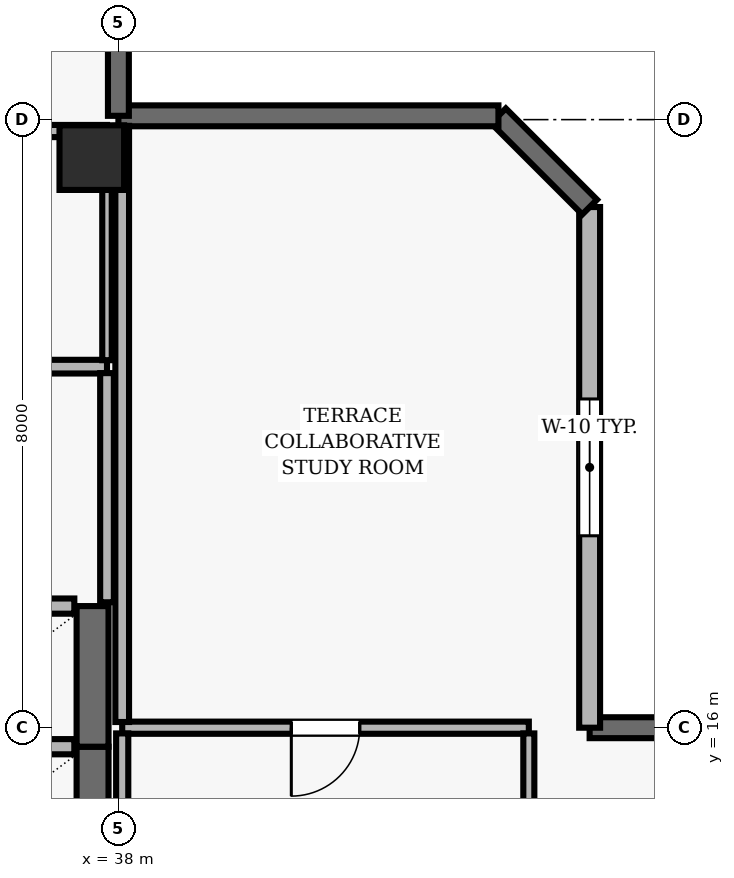
"""IFC4 building model, lengths in metres.
Left out: names, types, materials, properties, quantities, classifications, styles, units other than length and angle.
Written with IfcOpenShell. Run it as: python <this file> out.ifc"""

import sys

from ifc_helpers import new_model, si_unit, direction, frame, frame_2d, origin, origin_2d, place, context, subcontext, project, spatial, rectangle, extrude, element, fill, save


model = new_model("IFC4")
c1 = context("Model", 3, precision=1e-05, world=origin(), true_north=direction((0.0, 1.0)))
c2 = subcontext(c1, "Body", "Model", "MODEL_VIEW")
j1 = project(units=[si_unit("LENGTHUNIT", "METRE"), si_unit("PLANEANGLEUNIT", "RADIAN")], contexts=[c1])
p1 = place(None, origin())
s1 = spatial("IfcSite", under=j1, at=p1, CompositionType="ELEMENT")
p2 = place(p1, origin())
s2 = spatial("IfcBuilding", under=s1, at=p2, CompositionType="ELEMENT")
p3 = place(p2, frame((0.0, 0.0, 263.8)))
s3 = spatial("IfcBuildingStorey", under=s2, at=p3, CompositionType="ELEMENT", Elevation=263.8)
p4 = place(p3, frame((37.65, 23.5, 0.0), z_axis=(0.0, 0.0, 1.0), x_axis=(1.0, 0.0, 0.0)))
e1 = element("IfcColumn", 1, at=p4, inside=s3, PredefinedType="COLUMN", context=c2, shape_type="SweptSolid", body=[
    extrude(rectangle(XDim=0.85, YDim=0.85, at=origin_2d()), origin(), (0.0, 0.0, 1.0), 3.9),
])
p5 = place(p3, frame((57.3, 16.0, 0.0), z_axis=(0.0, 0.0, 1.0), x_axis=(-1.0, 0.0, 0.0)))
e2 = element("IfcWall", 2, at=p5, inside=s3, PredefinedType="SOLIDWALL", context=c2, shape_type="SweptSolid", body=[
    extrude(rectangle(XDim=13.1, YDim=0.275, at=frame_2d((6.55, 0.0))), origin(), (0.0, 0.0, 1.0), 3.69),
])
p6 = place(p5, frame((7.05, 0.0, 0.0)))
e3 = element("IfcOpeningElement", 3, at=p6, cuts=e2, PredefinedType="OPENING", context=c2, shape_type="SweptSolid", body=[
    extrude(rectangle(XDim=1.0, YDim=2.2, at=frame_2d((0.5, 1.1))), frame((0.0, 0.147, 0.0), z_axis=(0.0, -1.0, 0.0), x_axis=(1.0, 0.0, 0.0)), (0.0, 0.0, 1.0), 0.295),
])
p7 = place(p5, frame((1.875, 0.0, 0.9)))
e4 = element("IfcOpeningElement", 4, at=p7, cuts=e2, PredefinedType="OPENING", context=c2, shape_type="SweptSolid", body=[
    extrude(rectangle(XDim=2.8, YDim=1.8, at=frame_2d((1.4, 0.9))), frame((0.0, 0.147, 0.0), z_axis=(0.0, -1.0, 0.0), x_axis=(1.0, 0.0, 0.0)), (0.0, 0.0, 1.0), 0.295),
])
p8 = place(p5, frame((8.425, 0.0, 0.9)))
e5 = element("IfcOpeningElement", 5, at=p8, cuts=e2, PredefinedType="OPENING", context=c2, shape_type="SweptSolid", body=[
    extrude(rectangle(XDim=2.8, YDim=1.8, at=frame_2d((1.4, 0.9))), frame((0.0, 0.147, 0.0), z_axis=(0.0, -1.0, 0.0), x_axis=(1.0, 0.0, 0.0)), (0.0, 0.0, 1.0), 0.295),
])
p9 = place(p3, frame((44.2, 16.0, 0.0), z_axis=(0.0, 0.0, 1.0), x_axis=(0.0, 1.0, 0.0)))
e6 = element("IfcWall", 6, at=p9, inside=s3, PredefinedType="SOLIDWALL", context=c2, shape_type="SweptSolid", body=[
    extrude(rectangle(XDim=6.85, YDim=0.275, at=frame_2d((3.425, 0.0))), origin(), (0.0, 0.0, 1.0), 3.69),
])
p10 = place(p9, frame((2.525, 0.0, 0.9)))
e7 = element("IfcOpeningElement", 7, at=p10, cuts=e6, PredefinedType="OPENING", context=c2, shape_type="SweptSolid", body=[
    extrude(rectangle(XDim=1.8, YDim=2.2, at=frame_2d((0.9, 1.1))), frame((0.0, 0.147, 0.0), z_axis=(0.0, -1.0, 0.0), x_axis=(1.0, 0.0, 0.0)), (0.0, 0.0, 1.0), 0.295),
])
p11 = place(p3, frame((44.2, 22.85, 0.0), z_axis=(0.0, 0.0, 1.0), x_axis=(-0.707106781187, 0.707106781187, 0.0)))
e8 = element("IfcWall", 8, at=p11, inside=s3, PredefinedType="SOLIDWALL", context=c2, shape_type="SweptSolid", body=[
    extrude(rectangle(XDim=1.697, YDim=0.275, at=frame_2d((0.849, 0.0))), origin(), (0.0, 0.0, 1.0), 3.69),
])
p12 = place(p3, frame((43.0, 24.05, 0.0), z_axis=(0.0, 0.0, 1.0), x_axis=(-1.0, 0.0, 0.0)))
e9 = element("IfcWall", 9, at=p12, inside=s3, PredefinedType="SOLIDWALL", context=c2, shape_type="SweptSolid", body=[
    extrude(rectangle(XDim=5.0, YDim=0.275, at=frame_2d((2.5, 0.0))), origin(), (0.0, 0.0, 1.0), 3.69),
])
p13 = place(p3, frame((38.0, 24.05, 0.0), z_axis=(0.0, 0.0, 1.0), x_axis=(0.0, 1.0, 0.0)))
e10 = element("IfcWall", 10, at=p13, inside=s3, PredefinedType="SOLIDWALL", context=c2, shape_type="SweptSolid", body=[
    extrude(rectangle(XDim=11.25, YDim=0.275, at=frame_2d((5.625, 0.0))), origin(), (0.0, 0.0, 1.0), 3.69),
])
p14 = place(p13, frame((7.425, 0.0, 0.0)))
e11 = element("IfcOpeningElement", 11, at=p14, cuts=e10, PredefinedType="OPENING", context=c2, shape_type="SweptSolid", body=[
    extrude(rectangle(XDim=1.0, YDim=2.2, at=frame_2d((0.5, 1.1))), frame((0.0, 0.147, 0.0), z_axis=(0.0, -1.0, 0.0), x_axis=(1.0, 0.0, 0.0)), (0.0, 0.0, 1.0), 0.295),
])
p15 = place(p13, frame((2.662, 0.0, 0.9)))
e12 = element("IfcOpeningElement", 12, at=p15, cuts=e10, PredefinedType="OPENING", context=c2, shape_type="SweptSolid", body=[
    extrude(rectangle(XDim=1.2, YDim=1.6, at=frame_2d((0.6, 0.8))), frame((0.0, 0.147, 0.0), z_axis=(0.0, -1.0, 0.0), x_axis=(1.0, 0.0, 0.0)), (0.0, 0.0, 1.0), 0.295),
])
p16 = place(p3, frame((37.66, 13.9, 0.0), z_axis=(0.0, 0.0, 1.0), x_axis=(0.0, 1.0, 0.0)))
e13 = element("IfcWall", 13, at=p16, inside=s3, PredefinedType="SHEAR", context=c2, shape_type="SweptSolid", body=[
    extrude(rectangle(XDim=1.85, YDim=0.42, at=frame_2d((0.925, 0.0))), origin(), (0.0, 0.0, 1.0), 3.69),
])
p17 = place(p3, frame((37.42, 15.75, 0.0), z_axis=(0.0, 0.0, 1.0), x_axis=(-1.0, 0.0, 0.0)))
e14 = element("IfcWall", 14, at=p17, inside=s3, PredefinedType="SOLIDWALL", context=c2, shape_type="SweptSolid", body=[
    extrude(rectangle(XDim=2.14, YDim=0.2, at=frame_2d((1.07, 0.0))), origin(), (0.0, 0.0, 1.0), 3.69),
])
p18 = place(p3, frame((37.66, 15.75, 0.0), z_axis=(0.0, 0.0, 1.0), x_axis=(0.0, 1.0, 0.0)))
e15 = element("IfcWall", 15, at=p18, inside=s3, PredefinedType="SHEAR", context=c2, shape_type="SweptSolid", body=[
    extrude(rectangle(XDim=1.85, YDim=0.42, at=frame_2d((0.925, 0.0))), origin(), (0.0, 0.0, 1.0), 3.69),
])
p19 = place(p3, frame((37.42, 17.6, 0.0), z_axis=(0.0, 0.0, 1.0), x_axis=(-1.0, 0.0, 0.0)))
e16 = element("IfcWall", 16, at=p19, inside=s3, PredefinedType="SOLIDWALL", context=c2, shape_type="SweptSolid", body=[
    extrude(rectangle(XDim=2.14, YDim=0.2, at=frame_2d((1.07, 0.0))), origin(), (0.0, 0.0, 1.0), 3.69),
])
p20 = place(p3, frame((37.85, 20.75, 0.0), z_axis=(0.0, 0.0, 1.0), x_axis=(-1.0, 0.0, 0.0)))
e17 = element("IfcWall", 17, at=p20, inside=s3, PredefinedType="PARTITIONING", context=c2, shape_type="SweptSolid", body=[
    extrude(rectangle(XDim=4.0, YDim=0.18, at=frame_2d((2.0, 0.0))), origin(), (0.0, 0.0, 1.0), 3.69),
])
p21 = place(p3, frame((37.85, 23.85, 0.0), z_axis=(0.0, 0.0, 1.0), x_axis=(-1.0, 0.0, 0.0)))
e18 = element("IfcWall", 18, at=p21, inside=s3, PredefinedType="PARTITIONING", context=c2, shape_type="SweptSolid", body=[
    extrude(rectangle(XDim=4.0, YDim=0.16, at=frame_2d((2.0, 0.0))), origin(), (0.0, 0.0, 1.0), 3.221),
])
p22 = place(p21, frame((1.9, 0.0, 0.0)))
e19 = element("IfcOpeningElement", 19, at=p22, cuts=e18, PredefinedType="OPENING", context=c2, shape_type="SweptSolid", body=[
    extrude(rectangle(XDim=0.9, YDim=2.1, at=frame_2d((0.45, 1.05))), frame((0.0, 0.09, 0.0), z_axis=(0.0, -1.0, 0.0), x_axis=(1.0, 0.0, 0.0)), (0.0, 0.0, 1.0), 0.18),
])
p23 = place(p3, frame((43.4, 16.0, 0.0), z_axis=(0.0, 0.0, 1.0), x_axis=(-1.0, 0.0, 0.0)))
e20 = element("IfcWall", 20, at=p23, inside=s3, PredefinedType="PARTITIONING", context=c2, shape_type="SweptSolid", body=[
    extrude(rectangle(XDim=5.35, YDim=0.16, at=frame_2d((2.675, 0.0))), origin(), (0.0, 0.0, 1.0), 3.39),
])
p24 = place(p23, frame((2.225, 0.0, 0.0)))
e21 = element("IfcOpeningElement", 21, at=p24, cuts=e20, PredefinedType="OPENING", context=c2, shape_type="SweptSolid", body=[
    extrude(rectangle(XDim=0.9, YDim=2.1, at=frame_2d((0.45, 1.05))), frame((0.0, 0.09, 0.0), z_axis=(0.0, -1.0, 0.0), x_axis=(1.0, 0.0, 0.0)), (0.0, 0.0, 1.0), 0.18),
])
p25 = place(p3, frame((37.85, 17.65, 0.0), z_axis=(0.0, 0.0, 1.0), x_axis=(0.0, 1.0, 0.0)))
e22 = element("IfcWall", 22, at=p25, inside=s3, PredefinedType="PARTITIONING", context=c2, shape_type="SweptSolid", body=[
    extrude(rectangle(XDim=3.015, YDim=0.18, at=frame_2d((1.508, 0.0))), origin(), (0.0, 0.0, 1.0), 3.221),
])
p26 = place(p3, frame((37.85, 20.835, 0.0), z_axis=(0.0, 0.0, 1.0), x_axis=(0.0, 1.0, 0.0)))
e23 = element("IfcWall", 23, at=p26, inside=s3, PredefinedType="PARTITIONING", context=c2, shape_type="SweptSolid", body=[
    extrude(rectangle(XDim=2.94, YDim=0.125, at=frame_2d((1.47, 0.0))), origin(), (0.0, 0.0, 1.0), 3.221),
])
p27 = place(p3, frame((38.05, 15.925, 0.0), z_axis=(0.0, 0.0, 1.0), x_axis=(0.0, -1.0, 0.0)))
e24 = element("IfcWall", 24, at=p27, inside=s3, PredefinedType="PARTITIONING", context=c2, shape_type="SweptSolid", body=[
    extrude(rectangle(XDim=6.375, YDim=0.16, at=frame_2d((3.188, 0.0))), origin(), (0.0, 0.0, 1.0), 3.221),
])
p28 = place(p3, frame((38.05, 23.918, 0.0), z_axis=(0.0, 0.0, 1.0), x_axis=(0.0, -1.0, 0.0)))
e25 = element("IfcWall", 25, at=p28, inside=s3, PredefinedType="PARTITIONING", context=c2, shape_type="SweptSolid", body=[
    extrude(rectangle(XDim=7.843, YDim=0.18, at=frame_2d((3.921, 0.0))), origin(), (0.0, 0.0, 1.0), 3.221),
])
p29 = place(p3, frame((43.4, 10.418, 0.0), z_axis=(0.0, 0.0, 1.0), x_axis=(0.0, 1.0, 0.0)))
e26 = element("IfcWall", 26, at=p29, inside=s3, PredefinedType="PARTITIONING", context=c2, shape_type="SweptSolid", body=[
    extrude(rectangle(XDim=5.507, YDim=0.145, at=frame_2d((2.753, 0.0))), origin(), (0.0, 0.0, 1.0), 3.69),
])
p30 = place(p10, origin())
e27 = element("IfcWindow", 27, at=p30, inside=s3, PartitioningType="SINGLE_PANEL", PredefinedType="WINDOW", context=c2, shape_type="SweptSolid", body=[
    extrude(rectangle(XDim=1.8, YDim=2.2, at=frame_2d((0.9, 1.1))), frame((0.0, 0.03, 0.0), z_axis=(0.0, -1.0, 0.0), x_axis=(1.0, 0.0, 0.0)), (0.0, 0.0, 1.0), 0.06),
])
fill(e7, e27)
p31 = place(p24, origin())
e28 = element("IfcDoor", 28, at=p31, inside=s3, OperationType="SINGLE_SWING_RIGHT", PredefinedType="DOOR", context=c2, shape_type="SweptSolid", body=[
    extrude(rectangle(XDim=0.9, YDim=2.1, at=frame_2d((0.45, 1.05))), frame((0.0, 0.025, 0.0), z_axis=(0.0, -1.0, 0.0), x_axis=(1.0, 0.0, 0.0)), (0.0, 0.0, 1.0), 0.05),
])
fill(e21, e28)
save(model, sys.argv[1])
